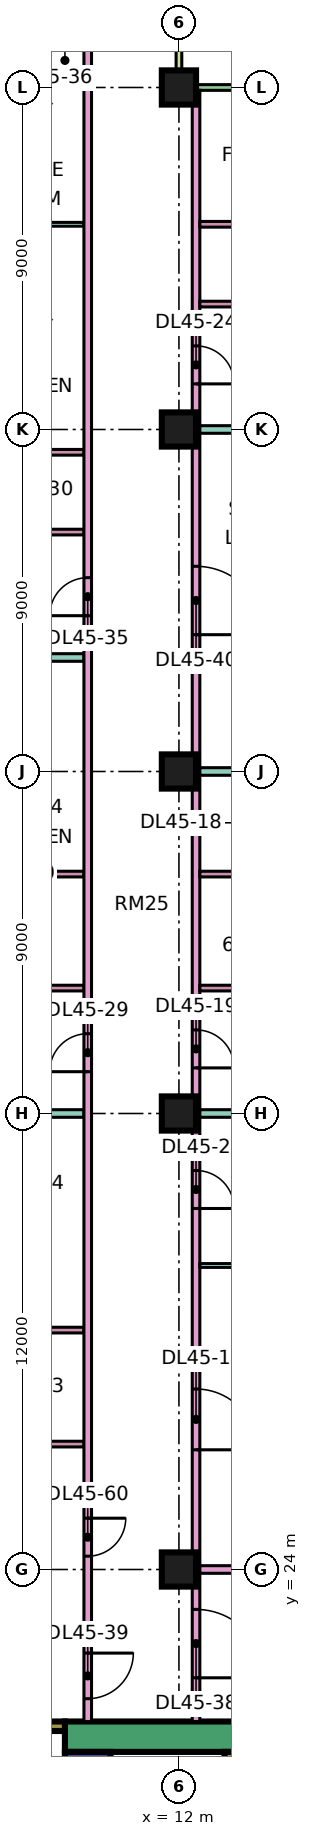
"""IFC4 building model, lengths in metres.
Left out: names, types, materials, properties, quantities, classifications, styles, units other than length and angle.
Written with IfcOpenShell. Run it as: python <this file> out.ifc"""

import sys

from ifc_helpers import new_model, si_unit, direction, frame, frame_2d, origin, origin_2d, place, context, subcontext, project, spatial, rectangle, extrude, element, fill, save


model = new_model("IFC4")
c1 = context("Model", 3, precision=1e-05, world=origin(), true_north=direction((0.0, 1.0)))
c2 = subcontext(c1, "Body", "Model", "MODEL_VIEW")
j1 = project(units=[si_unit("LENGTHUNIT", "METRE"), si_unit("PLANEANGLEUNIT", "RADIAN")], contexts=[c1])
p1 = place(None, origin())
s1 = spatial("IfcSite", under=j1, at=p1, CompositionType="ELEMENT")
p2 = place(p1, origin())
s2 = spatial("IfcBuilding", under=s1, at=p2, CompositionType="ELEMENT")
p3 = place(p2, frame((0.0, 0.0, 194.9)))
s3 = spatial("IfcBuildingStorey", under=s2, at=p3, CompositionType="ELEMENT", Elevation=194.9)
for number, where, z_axis, x_axis in (
    (1, (12.0, 24.0, 0.0), (0.0, 0.0, 1.0), (1.0, 0.0, 0.0)),
    (2, (12.0, 36.0, 0.0), (0.0, 0.0, 1.0), (1.0, 0.0, 0.0)),
    (3, (12.0, 45.0, 0.0), (0.0, 0.0, 1.0), (1.0, 0.0, 0.0)),
    (4, (12.0, 54.0, 0.0), (0.0, 0.0, 1.0), (1.0, 0.0, 0.0)),
    (5, (12.0, 63.0, 0.0), (0.0, 0.0, 1.0), (1.0, 0.0, 0.0)),
):
    element("IfcColumn", number, at=place(p3, frame(where, z_axis=z_axis, x_axis=x_axis)), inside=s3, PredefinedType="COLUMN", context=c2, shape_type="SweptSolid", body=[
        extrude(rectangle(XDim=0.9, YDim=0.9, at=origin_2d()), origin(), (0.0, 0.0, 1.0), 3.75),
    ])
p4 = place(p3, frame((9.0, 19.6, 0.0), z_axis=(0.0, 0.0, 1.0), x_axis=(1.0, 0.0, 0.0)))
e6 = element("IfcWall", 6, at=p4, inside=s3, PredefinedType="SHEAR", context=c2, shape_type="SweptSolid", body=[
    extrude(rectangle(XDim=25.0, YDim=0.8, at=frame_2d((12.5, 0.0))), origin(), (0.0, 0.0, 1.0), 3.75),
])
p5 = place(p4, frame((19.1, 0.0, 0.0)))
e7 = element("IfcOpeningElement", 7, at=p5, cuts=e6, PredefinedType="OPENING", context=c2, shape_type="SweptSolid", body=[
    extrude(rectangle(XDim=1.8, YDim=2.4, at=frame_2d((0.9, 1.2))), frame((0.0, 0.41, 0.0), z_axis=(0.0, -1.0, 0.0), x_axis=(1.0, 0.0, 0.0)), (0.0, 0.0, 1.0), 0.82),
])
p6 = place(p3, frame((9.6, 7.8, 0.0), z_axis=(0.0, 0.0, 1.0), x_axis=(0.0, 1.0, 0.0)))
e8 = element("IfcWall", 8, at=p6, inside=s3, PredefinedType="SHEAR", context=c2, shape_type="SweptSolid", body=[
    extrude(rectangle(XDim=11.4, YDim=1.2, at=frame_2d((5.7, 0.0))), origin(), (0.0, 0.0, 1.0), 3.75),
])
p7 = place(p6, frame((4.075, 0.0, 0.0)))
e9 = element("IfcOpeningElement", 9, at=p7, cuts=e8, PredefinedType="OPENING", context=c2, shape_type="SweptSolid", body=[
    extrude(rectangle(XDim=1.1, YDim=2.2, at=frame_2d((0.55, 1.1))), frame((0.0, 0.61, 0.0), z_axis=(0.0, -1.0, 0.0), x_axis=(1.0, 0.0, 0.0)), (0.0, 0.0, 1.0), 1.22),
])
p8 = place(p6, frame((6.575, 0.0, 0.0)))
e10 = element("IfcOpeningElement", 10, at=p8, cuts=e8, PredefinedType="OPENING", context=c2, shape_type="SweptSolid", body=[
    extrude(rectangle(XDim=1.1, YDim=2.2, at=frame_2d((0.55, 1.1))), frame((0.0, 0.61, 0.0), z_axis=(0.0, -1.0, 0.0), x_axis=(1.0, 0.0, 0.0)), (0.0, 0.0, 1.0), 1.22),
])
p9 = place(p6, frame((9.4, 0.0, 0.0)))
e11 = element("IfcOpeningElement", 11, at=p9, cuts=e8, PredefinedType="OPENING", context=c2, shape_type="SweptSolid", body=[
    extrude(rectangle(XDim=1.1, YDim=2.2, at=frame_2d((0.55, 1.1))), frame((0.0, 0.61, 0.0), z_axis=(0.0, -1.0, 0.0), x_axis=(1.0, 0.0, 0.0)), (0.0, 0.0, 1.0), 1.22),
])
p10 = place(p6, frame((1.75, 0.0, 0.0)))
e12 = element("IfcOpeningElement", 12, at=p10, cuts=e8, PredefinedType="OPENING", context=c2, shape_type="SweptSolid", body=[
    extrude(rectangle(XDim=0.9, YDim=2.1, at=frame_2d((0.45, 1.05))), frame((0.0, 0.61, 0.0), z_axis=(0.0, -1.0, 0.0), x_axis=(1.0, 0.0, 0.0)), (0.0, 0.0, 1.0), 1.22),
])
p11 = place(p3, frame((13.325, 7.8, 0.0), z_axis=(0.0, 0.0, 1.0), x_axis=(0.0, 1.0, 0.0)))
e13 = element("IfcWall", 13, at=p11, inside=s3, PredefinedType="SHEAR", context=c2, shape_type="SweptSolid", body=[
    extrude(rectangle(XDim=11.4, YDim=0.25, at=frame_2d((5.7, 0.0))), origin(), (0.0, 0.0, 1.0), 3.75),
])
p12 = place(p3, frame((2.1, 19.875, 0.0), z_axis=(0.0, 0.0, 1.0), x_axis=(1.0, 0.0, 0.0)))
e14 = element("IfcWall", 14, at=p12, inside=s3, PredefinedType="SHEAR", context=c2, shape_type="SweptSolid", body=[
    extrude(rectangle(XDim=6.9, YDim=0.25, at=frame_2d((3.45, 0.0))), origin(), (0.0, 0.0, 1.0), 3.75),
])
p13 = place(p12, frame((1.175, 0.0, 0.0)))
e15 = element("IfcOpeningElement", 15, at=p13, cuts=e14, PredefinedType="OPENING", context=c2, shape_type="SweptSolid", body=[
    extrude(rectangle(XDim=1.1, YDim=2.2, at=frame_2d((0.55, 1.1))), frame((0.0, 0.135, 0.0), z_axis=(0.0, -1.0, 0.0), x_axis=(1.0, 0.0, 0.0)), (0.0, 0.0, 1.0), 0.27),
])
p14 = place(p12, frame((4.6, 0.0, 0.0)))
e16 = element("IfcOpeningElement", 16, at=p14, cuts=e14, PredefinedType="OPENING", context=c2, shape_type="SweptSolid", body=[
    extrude(rectangle(XDim=1.2, YDim=2.2, at=frame_2d((0.6, 1.1))), frame((0.0, 0.135, 0.0), z_axis=(0.0, -1.0, 0.0), x_axis=(1.0, 0.0, 0.0)), (0.0, 0.0, 1.0), 0.27),
])
p15 = place(p3, frame((22.425, 63.0, 0.0), z_axis=(0.0, 0.0, 1.0), x_axis=(-1.0, 0.0, 0.0)))
e17 = element("IfcWall", 17, at=p15, inside=s3, PredefinedType="SOLIDWALL", context=c2, shape_type="SweptSolid", body=[
    extrude(rectangle(XDim=10.35, YDim=0.15, at=frame_2d((5.175, 0.0))), origin(), (0.0, 0.0, 1.0), 3.35),
])
p16 = place(p15, frame((0.788, 0.0, 0.0)))
e18 = element("IfcOpeningElement", 18, at=p16, cuts=e17, PredefinedType="OPENING", context=c2, shape_type="SweptSolid", body=[
    extrude(rectangle(XDim=1.8, YDim=2.4, at=frame_2d((0.9, 1.2))), frame((0.0, 0.085, 0.0), z_axis=(0.0, -1.0, 0.0), x_axis=(1.0, 0.0, 0.0)), (0.0, 0.0, 1.0), 0.17),
])
p17 = place(p15, frame((5.725, 0.0, 0.45)))
e19 = element("IfcOpeningElement", 19, at=p17, cuts=e17, PredefinedType="OPENING", context=c2, shape_type="SweptSolid", body=[
    extrude(rectangle(XDim=3.0, YDim=2.4, at=frame_2d((1.5, 1.2))), frame((0.0, 0.085, 0.0), z_axis=(0.0, -1.0, 0.0), x_axis=(1.0, 0.0, 0.0)), (0.0, 0.0, 1.0), 0.17),
])
p18 = place(p3, frame((12.0, 64.5, 0.0), z_axis=(0.0, 0.0, 1.0), x_axis=(0.0, -1.0, 0.0)))
e20 = element("IfcWall", 20, at=p18, inside=s3, PredefinedType="SOLIDWALL", context=c2, shape_type="SweptSolid", body=[
    extrude(rectangle(XDim=1.5, YDim=0.15, at=frame_2d((0.75, 0.0))), origin(), (0.0, 0.0, 1.0), 3.35),
])
p19 = place(p3, frame((0.0, 48.0, 0.0), z_axis=(0.0, 0.0, 1.0), x_axis=(1.0, 0.0, 0.0)))
e21 = element("IfcWall", 21, at=p19, inside=s3, PredefinedType="PARTITIONING", context=c2, shape_type="SweptSolid", body=[
    extrude(rectangle(XDim=9.5, YDim=0.2, at=frame_2d((4.75, 0.0))), origin(), (0.0, 0.0, 1.0), 3.35),
])
p20 = place(p3, frame((0.074, 22.4, 0.0), z_axis=(0.0, 0.0, 1.0), x_axis=(1.0, 0.0, 0.0)))
e22 = element("IfcWall", 22, at=p20, inside=s3, PredefinedType="PARTITIONING", context=c2, shape_type="SweptSolid", body=[
    extrude(rectangle(XDim=9.426, YDim=0.2, at=frame_2d((4.713, 0.0))), origin(), (0.0, 0.0, 1.0), 3.35),
])
p21 = place(p3, frame((5.65, 36.0, 0.0), z_axis=(0.0, 0.0, 1.0), x_axis=(1.0, 0.0, 0.0)))
e23 = element("IfcWall", 23, at=p21, inside=s3, PredefinedType="PARTITIONING", context=c2, shape_type="SweptSolid", body=[
    extrude(rectangle(XDim=3.85, YDim=0.2, at=frame_2d((1.925, 0.0))), origin(), (0.0, 0.0, 1.0), 3.35),
])
for number, where, z_axis, x_axis in (
    (24, (6.675, 39.3, 0.0), (0.0, 0.0, 1.0), (1.0, 0.0, 0.0)),
    (25, (6.675, 42.3, 0.0), (0.0, 0.0, 1.0), (1.0, 0.0, 0.0)),
):
    element("IfcWall", number, at=place(p3, frame(where, z_axis=z_axis, x_axis=x_axis)), inside=s3, PredefinedType="PARTITIONING", context=c2, shape_type="SweptSolid", body=[
        extrude(rectangle(XDim=2.825, YDim=0.15, at=frame_2d((1.413, 0.0))), origin(), (0.0, 0.0, 1.0), 3.35),
    ])
p22 = place(p3, frame((6.675, 51.3, 0.0), z_axis=(0.0, 0.0, 1.0), x_axis=(1.0, 0.0, 0.0)))
e26 = element("IfcWall", 26, at=p22, inside=s3, PredefinedType="PARTITIONING", context=c2, shape_type="SweptSolid", body=[
    extrude(rectangle(XDim=2.825, YDim=0.15, at=frame_2d((1.413, 0.0))), origin(), (0.0, 0.0, 1.0), 3.35),
])
p23 = place(p22, frame((1.075, 0.0, 0.0)))
e27 = element("IfcOpeningElement", 27, at=p23, cuts=e26, PredefinedType="OPENING", context=c2, shape_type="SweptSolid", body=[
    extrude(rectangle(XDim=0.8, YDim=2.1, at=frame_2d((0.4, 1.05))), frame((0.0, 0.085, 0.0), z_axis=(0.0, -1.0, 0.0), x_axis=(1.0, 0.0, 0.0)), (0.0, 0.0, 1.0), 0.17),
])
p24 = place(p3, frame((6.675, 53.4, 0.0), z_axis=(0.0, 0.0, 1.0), x_axis=(1.0, 0.0, 0.0)))
e28 = element("IfcWall", 28, at=p24, inside=s3, PredefinedType="PARTITIONING", context=c2, shape_type="SweptSolid", body=[
    extrude(rectangle(XDim=2.825, YDim=0.15, at=frame_2d((1.413, 0.0))), origin(), (0.0, 0.0, 1.0), 3.35),
])
p25 = place(p3, frame((6.675, 59.4, 0.0), z_axis=(0.0, 0.0, 1.0), x_axis=(1.0, 0.0, 0.0)))
e29 = element("IfcWall", 29, at=p25, inside=s3, PredefinedType="PARTITIONING", context=c2, shape_type="SweptSolid", body=[
    extrude(rectangle(XDim=2.825, YDim=0.1, at=frame_2d((1.413, 0.0))), origin(), (0.0, 0.0, 1.0), 3.35),
])
for number, where, z_axis, x_axis in (
    (30, (6.975, 27.3, 0.0), (0.0, 0.0, 1.0), (1.0, 0.0, 0.0)),
    (31, (6.975, 30.3, 0.0), (0.0, 0.0, 1.0), (1.0, 0.0, 0.0)),
):
    element("IfcWall", number, at=place(p3, frame(where, z_axis=z_axis, x_axis=x_axis)), inside=s3, PredefinedType="PARTITIONING", context=c2, shape_type="SweptSolid", body=[
        extrude(rectangle(XDim=2.525, YDim=0.15, at=frame_2d((1.262, 0.0))), origin(), (0.0, 0.0, 1.0), 3.35),
    ])
p26 = place(p3, frame((9.6, 20.0, 0.0), z_axis=(0.0, 0.0, 1.0), x_axis=(0.0, 1.0, 0.0)))
e32 = element("IfcWall", 32, at=p26, inside=s3, PredefinedType="PARTITIONING", context=c2, shape_type="SweptSolid", body=[
    extrude(rectangle(XDim=44.35, YDim=0.2, at=frame_2d((22.175, 0.0))), origin(), (0.0, 0.0, 1.0), 3.35),
])
p27 = place(p26, frame((17.1, 0.0, 0.0)))
e33 = element("IfcOpeningElement", 33, at=p27, cuts=e32, PredefinedType="OPENING", context=c2, shape_type="SweptSolid", body=[
    extrude(rectangle(XDim=1.0, YDim=2.1, at=frame_2d((0.5, 1.05))), frame((0.0, 0.11, 0.0), z_axis=(0.0, -1.0, 0.0), x_axis=(1.0, 0.0, 0.0)), (0.0, 0.0, 1.0), 0.22),
])
p28 = place(p26, frame((29.1, 0.0, 0.0)))
e34 = element("IfcOpeningElement", 34, at=p28, cuts=e32, PredefinedType="OPENING", context=c2, shape_type="SweptSolid", body=[
    extrude(rectangle(XDim=1.0, YDim=2.1, at=frame_2d((0.5, 1.05))), frame((0.0, 0.11, 0.0), z_axis=(0.0, -1.0, 0.0), x_axis=(1.0, 0.0, 0.0)), (0.0, 0.0, 1.0), 0.22),
])
p29 = place(p26, frame((0.6, 0.0, 0.0)))
e35 = element("IfcOpeningElement", 35, at=p29, cuts=e32, PredefinedType="OPENING", context=c2, shape_type="SweptSolid", body=[
    extrude(rectangle(XDim=1.2, YDim=2.1, at=frame_2d((0.6, 1.05))), frame((0.0, 0.11, 0.0), z_axis=(0.0, -1.0, 0.0), x_axis=(1.0, 0.0, 0.0)), (0.0, 0.0, 1.0), 0.22),
])
p30 = place(p26, frame((4.35, 0.0, 0.0)))
e36 = element("IfcOpeningElement", 36, at=p30, cuts=e32, PredefinedType="OPENING", context=c2, shape_type="SweptSolid", body=[
    extrude(rectangle(XDim=1.0, YDim=2.1, at=frame_2d((0.5, 1.05))), frame((0.0, 0.11, 0.0), z_axis=(0.0, -1.0, 0.0), x_axis=(1.0, 0.0, 0.0)), (0.0, 0.0, 1.0), 0.22),
])
p31 = place(p3, frame((12.45, 20.0, 0.0), z_axis=(0.0, 0.0, 1.0), x_axis=(0.0, 1.0, 0.0)))
e37 = element("IfcWall", 37, at=p31, inside=s3, PredefinedType="PARTITIONING", context=c2, shape_type="SweptSolid", body=[
    extrude(rectangle(XDim=42.926, YDim=0.2, at=frame_2d((21.463, 0.0))), origin(), (0.0, 0.0, 1.0), 3.35),
])
p32 = place(p31, frame((7.15, 0.0, 0.0)))
e38 = element("IfcOpeningElement", 38, at=p32, cuts=e37, PredefinedType="OPENING", context=c2, shape_type="SweptSolid", body=[
    extrude(rectangle(XDim=1.6, YDim=2.1, at=frame_2d((0.8, 1.05))), frame((0.0, 0.11, 0.0), z_axis=(0.0, -1.0, 0.0), x_axis=(1.0, 0.0, 0.0)), (0.0, 0.0, 1.0), 0.22),
])
p33 = place(p31, frame((13.5, 0.0, 0.0)))
e39 = element("IfcOpeningElement", 39, at=p33, cuts=e37, PredefinedType="OPENING", context=c2, shape_type="SweptSolid", body=[
    extrude(rectangle(XDim=1.0, YDim=2.1, at=frame_2d((0.5, 1.05))), frame((0.0, 0.11, 0.0), z_axis=(0.0, -1.0, 0.0), x_axis=(1.0, 0.0, 0.0)), (0.0, 0.0, 1.0), 0.22),
])
p34 = place(p31, frame((17.2, 0.0, 0.0)))
e40 = element("IfcOpeningElement", 40, at=p34, cuts=e37, PredefinedType="OPENING", context=c2, shape_type="SweptSolid", body=[
    extrude(rectangle(XDim=1.0, YDim=2.1, at=frame_2d((0.5, 1.05))), frame((0.0, 0.11, 0.0), z_axis=(0.0, -1.0, 0.0), x_axis=(1.0, 0.0, 0.0)), (0.0, 0.0, 1.0), 0.22),
])
p35 = place(p31, frame((35.2, 0.0, 0.0)))
e41 = element("IfcOpeningElement", 41, at=p35, cuts=e37, PredefinedType="OPENING", context=c2, shape_type="SweptSolid", body=[
    extrude(rectangle(XDim=1.0, YDim=2.1, at=frame_2d((0.5, 1.05))), frame((0.0, 0.11, 0.0), z_axis=(0.0, -1.0, 0.0), x_axis=(1.0, 0.0, 0.0)), (0.0, 0.0, 1.0), 0.22),
])
p36 = place(p31, frame((1.15, 0.0, 0.0)))
e42 = element("IfcOpeningElement", 42, at=p36, cuts=e37, PredefinedType="OPENING", context=c2, shape_type="SweptSolid", body=[
    extrude(rectangle(XDim=1.8, YDim=2.1, at=frame_2d((0.9, 1.05))), frame((0.0, 0.11, 0.0), z_axis=(0.0, -1.0, 0.0), x_axis=(1.0, 0.0, 0.0)), (0.0, 0.0, 1.0), 0.22),
])
p37 = place(p31, frame((28.6, 0.0, 0.0)))
e43 = element("IfcOpeningElement", 43, at=p37, cuts=e37, PredefinedType="OPENING", context=c2, shape_type="SweptSolid", body=[
    extrude(rectangle(XDim=1.8, YDim=2.1, at=frame_2d((0.9, 1.05))), frame((0.0, 0.11, 0.0), z_axis=(0.0, -1.0, 0.0), x_axis=(1.0, 0.0, 0.0)), (0.0, 0.0, 1.0), 0.22),
])
p38 = place(p3, frame((12.55, 24.0, 0.0), z_axis=(0.0, 0.0, 1.0), x_axis=(1.0, 0.0, 0.0)))
e44 = element("IfcWall", 44, at=p38, inside=s3, PredefinedType="PARTITIONING", context=c2, shape_type="SweptSolid", body=[
    extrude(rectangle(XDim=8.95, YDim=0.2, at=frame_2d((4.475, 0.0))), origin(), (0.0, 0.0, 1.0), 3.35),
])
p39 = place(p3, frame((12.55, 32.0, 0.0), z_axis=(0.0, 0.0, 1.0), x_axis=(1.0, 0.0, 0.0)))
e45 = element("IfcWall", 45, at=p39, inside=s3, PredefinedType="PARTITIONING", context=c2, shape_type="SweptSolid", body=[
    extrude(rectangle(XDim=8.95, YDim=0.1, at=frame_2d((4.475, 0.0))), origin(), (0.0, 0.0, 1.0), 3.35),
])
p40 = place(p3, frame((12.55, 36.0, 0.0), z_axis=(0.0, 0.0, 1.0), x_axis=(1.0, 0.0, 0.0)))
e46 = element("IfcWall", 46, at=p40, inside=s3, PredefinedType="PARTITIONING", context=c2, shape_type="SweptSolid", body=[
    extrude(rectangle(XDim=11.45, YDim=0.2, at=frame_2d((5.725, 0.0))), origin(), (0.0, 0.0, 1.0), 3.35),
])
for number, where, z_axis, x_axis in (
    (47, (12.55, 39.3, 0.0), (0.0, 0.0, 1.0), (1.0, 0.0, 0.0)),
    (48, (12.55, 42.3, 0.0), (0.0, 0.0, 1.0), (1.0, 0.0, 0.0)),
):
    element("IfcWall", number, at=place(p3, frame(where, z_axis=z_axis, x_axis=x_axis)), inside=s3, PredefinedType="PARTITIONING", context=c2, shape_type="SweptSolid", body=[
        extrude(rectangle(XDim=4.625, YDim=0.15, at=frame_2d((2.312, 0.0))), origin(), (0.0, 0.0, 1.0), 3.35),
    ])
p41 = place(p3, frame((12.55, 45.0, 0.0), z_axis=(0.0, 0.0, 1.0), x_axis=(1.0, 0.0, 0.0)))
e49 = element("IfcWall", 49, at=p41, inside=s3, PredefinedType="PARTITIONING", context=c2, shape_type="SweptSolid", body=[
    extrude(rectangle(XDim=11.376, YDim=0.2, at=frame_2d((5.688, 0.0))), origin(), (0.0, 0.0, 1.0), 3.35),
])
p42 = place(p3, frame((12.55, 54.0, 0.0), z_axis=(0.0, 0.0, 1.0), x_axis=(1.0, 0.0, 0.0)))
e50 = element("IfcWall", 50, at=p42, inside=s3, PredefinedType="PARTITIONING", context=c2, shape_type="SweptSolid", body=[
    extrude(rectangle(XDim=11.45, YDim=0.2, at=frame_2d((5.725, 0.0))), origin(), (0.0, 0.0, 1.0), 3.35),
])
for number, where, z_axis, x_axis in (
    (51, (12.55, 57.3, 0.0), (0.0, 0.0, 1.0), (1.0, 0.0, 0.0)),
    (52, (12.55, 59.4, 0.0), (0.0, 0.0, 1.0), (1.0, 0.0, 0.0)),
):
    element("IfcWall", number, at=place(p3, frame(where, z_axis=z_axis, x_axis=x_axis)), inside=s3, PredefinedType="PARTITIONING", context=c2, shape_type="SweptSolid", body=[
        extrude(rectangle(XDim=5.225, YDim=0.15, at=frame_2d((2.612, 0.0))), origin(), (0.0, 0.0, 1.0), 3.35),
    ])
p43 = place(p32, frame((1.6, 0.0, 0.0), z_axis=(0.0, 0.0, 1.0), x_axis=(-1.0, 0.0, 0.0)))
e53 = element("IfcDoor", 53, at=p43, inside=s3, OperationType="DOUBLE_DOOR_SINGLE_SWING", PredefinedType="DOOR", context=c2, shape_type="SweptSolid", body=[
    extrude(rectangle(XDim=1.6, YDim=2.1, at=frame_2d((0.8, 1.05))), frame((0.0, 0.025, 0.0), z_axis=(0.0, -1.0, 0.0), x_axis=(1.0, 0.0, 0.0)), (0.0, 0.0, 1.0), 0.05),
])
fill(e38, e53)
p44 = place(p33, frame((1.0, 0.0, 0.0), z_axis=(0.0, 0.0, 1.0), x_axis=(-1.0, 0.0, 0.0)))
e54 = element("IfcDoor", 54, at=p44, inside=s3, OperationType="SINGLE_SWING_LEFT", PredefinedType="DOOR", context=c2, shape_type="SweptSolid", body=[
    extrude(rectangle(XDim=1.0, YDim=2.1, at=frame_2d((0.5, 1.05))), frame((0.0, 0.025, 0.0), z_axis=(0.0, -1.0, 0.0), x_axis=(1.0, 0.0, 0.0)), (0.0, 0.0, 1.0), 0.05),
])
fill(e39, e54)
p45 = place(p34, frame((1.0, 0.0, 0.0), z_axis=(0.0, 0.0, 1.0), x_axis=(-1.0, 0.0, 0.0)))
e55 = element("IfcDoor", 55, at=p45, inside=s3, OperationType="SINGLE_SWING_LEFT", PredefinedType="DOOR", context=c2, shape_type="SweptSolid", body=[
    extrude(rectangle(XDim=1.0, YDim=2.1, at=frame_2d((0.5, 1.05))), frame((0.0, 0.025, 0.0), z_axis=(0.0, -1.0, 0.0), x_axis=(1.0, 0.0, 0.0)), (0.0, 0.0, 1.0), 0.05),
])
fill(e40, e55)
p46 = place(p35, frame((1.0, 0.0, 0.0), z_axis=(0.0, 0.0, 1.0), x_axis=(-1.0, 0.0, 0.0)))
e56 = element("IfcDoor", 56, at=p46, inside=s3, OperationType="SINGLE_SWING_LEFT", PredefinedType="DOOR", context=c2, shape_type="SweptSolid", body=[
    extrude(rectangle(XDim=1.0, YDim=2.1, at=frame_2d((0.5, 1.05))), frame((0.0, 0.025, 0.0), z_axis=(0.0, -1.0, 0.0), x_axis=(1.0, 0.0, 0.0)), (0.0, 0.0, 1.0), 0.05),
])
fill(e41, e56)
p47 = place(p27, origin())
e57 = element("IfcDoor", 57, at=p47, inside=s3, OperationType="SINGLE_SWING_LEFT", PredefinedType="DOOR", context=c2, shape_type="SweptSolid", body=[
    extrude(rectangle(XDim=1.0, YDim=2.1, at=frame_2d((0.5, 1.05))), frame((0.0, 0.025, 0.0), z_axis=(0.0, -1.0, 0.0), x_axis=(1.0, 0.0, 0.0)), (0.0, 0.0, 1.0), 0.05),
])
fill(e33, e57)
p48 = place(p28, origin())
e58 = element("IfcDoor", 58, at=p48, inside=s3, OperationType="SINGLE_SWING_LEFT", PredefinedType="DOOR", context=c2, shape_type="SweptSolid", body=[
    extrude(rectangle(XDim=1.0, YDim=2.1, at=frame_2d((0.5, 1.05))), frame((0.0, 0.025, 0.0), z_axis=(0.0, -1.0, 0.0), x_axis=(1.0, 0.0, 0.0)), (0.0, 0.0, 1.0), 0.05),
])
fill(e34, e58)
p49 = place(p36, frame((1.8, 0.0, 0.0), z_axis=(0.0, 0.0, 1.0), x_axis=(-1.0, 0.0, 0.0)))
e59 = element("IfcDoor", 59, at=p49, inside=s3, OperationType="DOUBLE_DOOR_SINGLE_SWING", PredefinedType="DOOR", context=c2, shape_type="SweptSolid", body=[
    extrude(rectangle(XDim=1.8, YDim=2.1, at=frame_2d((0.9, 1.05))), frame((0.0, 0.025, 0.0), z_axis=(0.0, -1.0, 0.0), x_axis=(1.0, 0.0, 0.0)), (0.0, 0.0, 1.0), 0.05),
])
fill(e42, e59)
p50 = place(p29, origin())
e60 = element("IfcDoor", 60, at=p50, inside=s3, OperationType="SINGLE_SWING_RIGHT", PredefinedType="DOOR", context=c2, shape_type="SweptSolid", body=[
    extrude(rectangle(XDim=1.2, YDim=2.1, at=frame_2d((0.6, 1.05))), frame((0.0, 0.025, 0.0), z_axis=(0.0, -1.0, 0.0), x_axis=(1.0, 0.0, 0.0)), (0.0, 0.0, 1.0), 0.05),
])
fill(e35, e60)
p51 = place(p37, frame((1.8, 0.0, 0.0), z_axis=(0.0, 0.0, 1.0), x_axis=(-1.0, 0.0, 0.0)))
e61 = element("IfcDoor", 61, at=p51, inside=s3, OperationType="DOUBLE_DOOR_SINGLE_SWING", PredefinedType="DOOR", context=c2, shape_type="SweptSolid", body=[
    extrude(rectangle(XDim=1.8, YDim=2.1, at=frame_2d((0.9, 1.05))), frame((0.0, 0.025, 0.0), z_axis=(0.0, -1.0, 0.0), x_axis=(1.0, 0.0, 0.0)), (0.0, 0.0, 1.0), 0.05),
])
fill(e43, e61)
p52 = place(p30, origin())
e62 = element("IfcDoor", 62, at=p52, inside=s3, OperationType="SINGLE_SWING_RIGHT", PredefinedType="DOOR", context=c2, shape_type="SweptSolid", body=[
    extrude(rectangle(XDim=1.0, YDim=2.1, at=frame_2d((0.5, 1.05))), frame((0.0, 0.025, 0.0), z_axis=(0.0, -1.0, 0.0), x_axis=(1.0, 0.0, 0.0)), (0.0, 0.0, 1.0), 0.05),
])
fill(e36, e62)
save(model, sys.argv[1])
